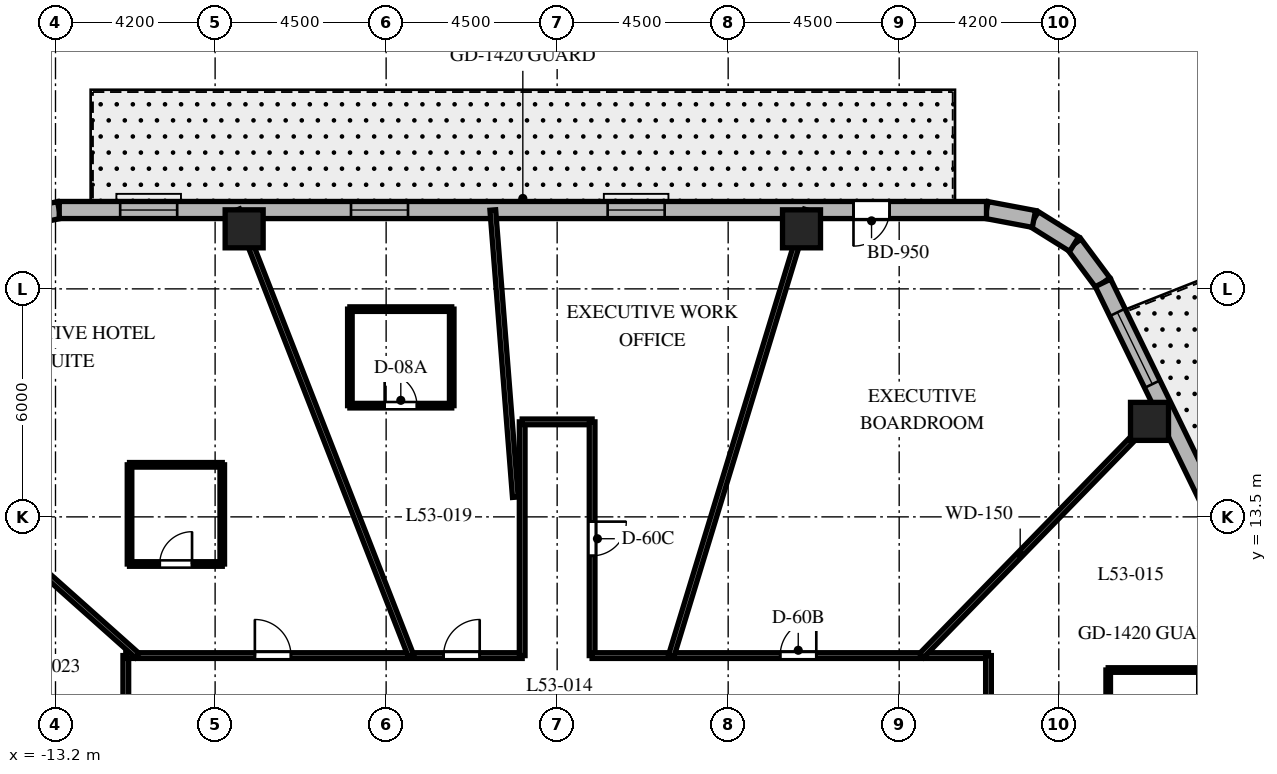
"""IFC4 building model, lengths in metres.
Left out: names, types, materials, properties, quantities, classifications, styles, units other than length and angle.
Written with IfcOpenShell. Run it as: python <this file> out.ifc"""

import sys

from ifc_helpers import new_model, si_unit, direction, frame, frame_2d, origin, origin_2d, place, context, subcontext, project, spatial, rectangle, extrude, element, fill, save


model = new_model("IFC4")
c1 = context("Model", 3, precision=1e-05, world=origin(), true_north=direction((0.0, 1.0)))
c2 = subcontext(c1, "Body", "Model", "MODEL_VIEW")
j1 = project(units=[si_unit("LENGTHUNIT", "METRE"), si_unit("PLANEANGLEUNIT", "RADIAN")], contexts=[c1])
p1 = place(None, origin())
s1 = spatial("IfcSite", under=j1, at=p1, CompositionType="ELEMENT")
p2 = place(p1, origin())
s2 = spatial("IfcBuilding", under=s1, at=p2, CompositionType="ELEMENT")
p3 = place(p2, frame((0.0, 0.0, 214.1)))
s3 = spatial("IfcBuildingStorey", under=s2, at=p3, CompositionType="ELEMENT", Elevation=214.1)
for number, where, z_axis, x_axis in (
    (1, (15.587, 16.013, 0.0), (0.0, 0.0, 1.0), (1.0, 0.0, 0.0)),
    (2, (6.43, 21.08, 0.0), (0.0, 0.0, 1.0), (1.0, 0.0, 0.0)),
    (3, (-8.236, 21.08, 0.0), (0.0, 0.0, 1.0), (1.0, 0.0, 0.0)),
):
    element("IfcColumn", number, at=place(p3, frame(where, z_axis=z_axis, x_axis=x_axis)), inside=s3, PredefinedType="COLUMN", context=c2, shape_type="SweptSolid", body=[
        extrude(rectangle(XDim=1.0, YDim=1.0, at=origin_2d()), origin(), (0.0, 0.0, 1.0), 3.8),
    ])
p4 = place(p3, frame((14.362, 19.658, 0.0), z_axis=(0.0, 0.0, 1.0), x_axis=(-0.596642462792, 0.80250717853, 0.0)))
e4 = element("IfcWall", 4, at=p4, inside=s3, PredefinedType="SOLIDWALL", context=c2, shape_type="SweptSolid", body=[
    extrude(rectangle(XDim=1.27, YDim=0.45, at=frame_2d((0.635, 0.0))), origin(), (0.0, 0.0, 1.0), 3.5),
])
p5 = place(p3, frame((13.604, 20.678, 0.0), z_axis=(0.0, 0.0, 1.0), x_axis=(-0.847910404124, 0.53013955387, 0.0)))
e5 = element("IfcWall", 5, at=p5, inside=s3, PredefinedType="SOLIDWALL", context=c2, shape_type="SweptSolid", body=[
    extrude(rectangle(XDim=1.249, YDim=0.45, at=frame_2d((0.624, 0.0))), origin(), (0.0, 0.0, 1.0), 3.5),
])
p6 = place(p3, frame((12.546, 21.34, 0.0), z_axis=(0.0, 0.0, 1.0), x_axis=(-0.982686750835, 0.18527479519, 0.0)))
e6 = element("IfcWall", 6, at=p6, inside=s3, PredefinedType="SOLIDWALL", context=c2, shape_type="SweptSolid", body=[
    extrude(rectangle(XDim=1.27, YDim=0.45, at=frame_2d((0.635, 0.0))), origin(), (0.0, 0.0, 1.0), 3.5),
])
p7 = place(p3, frame((-13.102, 21.575, 0.0), z_axis=(0.0, 0.0, 1.0), x_axis=(-0.978757421505, -0.205021730188, 0.0)))
e7 = element("IfcWall", 7, at=p7, inside=s3, PredefinedType="SOLIDWALL", context=c2, shape_type="SweptSolid", body=[
    extrude(rectangle(XDim=1.406, YDim=0.45, at=frame_2d((0.703, 0.0))), origin(), (0.0, 0.0, 1.0), 3.5),
])
p8 = place(p3, frame((22.74, 2.452, 0.0), z_axis=(0.0, 0.0, 1.0), x_axis=(-0.437753424814, 0.899095066755, 0.0)))
e8 = element("IfcWall", 8, at=p8, inside=s3, PredefinedType="SOLIDWALL", context=c2, shape_type="SweptSolid", body=[
    extrude(rectangle(XDim=19.137, YDim=0.45, at=frame_2d((9.569, 0.0))), origin(), (0.0, 0.0, 1.0), 3.5),
])
p9 = place(p8, frame((4.763, 0.0, 0.0)))
e9 = element("IfcOpeningElement", 9, at=p9, cuts=e8, PredefinedType="OPENING", context=c2, shape_type="SweptSolid", body=[
    extrude(rectangle(XDim=1.0, YDim=2.15, at=frame_2d((0.5, 1.075))), frame((0.0, 0.235, 0.0), z_axis=(0.0, -1.0, 0.0), x_axis=(1.0, 0.0, 0.0)), (0.0, 0.0, 1.0), 0.47),
])
p10 = place(p8, frame((8.57, 0.0, 0.8)))
e10 = element("IfcOpeningElement", 10, at=p10, cuts=e8, PredefinedType="OPENING", context=c2, shape_type="SweptSolid", body=[
    extrude(rectangle(XDim=2.1, YDim=1.85, at=frame_2d((1.05, 0.925))), frame((0.0, 0.235, 0.0), z_axis=(0.0, -1.0, 0.0), x_axis=(1.0, 0.0, 0.0)), (0.0, 0.0, 1.0), 0.47),
])
p11 = place(p8, frame((16.173, 0.0, 0.8)))
e11 = element("IfcOpeningElement", 11, at=p11, cuts=e8, PredefinedType="OPENING", context=c2, shape_type="SweptSolid", body=[
    extrude(rectangle(XDim=2.1, YDim=1.85, at=frame_2d((1.05, 0.925))), frame((0.0, 0.235, 0.0), z_axis=(0.0, -1.0, 0.0), x_axis=(1.0, 0.0, 0.0)), (0.0, 0.0, 1.0), 0.47),
])
p12 = place(p8, frame((0.916, 0.0, 0.8)))
e12 = element("IfcOpeningElement", 12, at=p12, cuts=e8, PredefinedType="OPENING", context=c2, shape_type="SweptSolid", body=[
    extrude(rectangle(XDim=2.1, YDim=1.85, at=frame_2d((1.05, 0.925))), frame((0.0, 0.235, 0.0), z_axis=(0.0, -1.0, 0.0), x_axis=(1.0, 0.0, 0.0)), (0.0, 0.0, 1.0), 0.47),
])
p13 = place(p3, frame((11.298, 21.575, 0.0), z_axis=(0.0, 0.0, 1.0), x_axis=(-1.0, 0.0, 0.0)))
e13 = element("IfcWall", 13, at=p13, inside=s3, PredefinedType="SOLIDWALL", context=c2, shape_type="SweptSolid", body=[
    extrude(rectangle(XDim=24.399, YDim=0.45, at=frame_2d((12.2, 0.0))), origin(), (0.0, 0.0, 1.0), 3.5),
])
p14 = place(p13, frame((2.55, 0.0, 0.0)))
e14 = element("IfcOpeningElement", 14, at=p14, cuts=e13, PredefinedType="OPENING", context=c2, shape_type="SweptSolid", body=[
    extrude(rectangle(XDim=0.95, YDim=2.15, at=frame_2d((0.475, 1.075))), frame((0.0, 0.235, 0.0), z_axis=(0.0, -1.0, 0.0), x_axis=(1.0, 0.0, 0.0)), (0.0, 0.0, 1.0), 0.47),
])
p15 = place(p13, frame((8.469, 0.0, 0.8)))
e15 = element("IfcOpeningElement", 15, at=p15, cuts=e13, PredefinedType="OPENING", context=c2, shape_type="SweptSolid", body=[
    extrude(rectangle(XDim=1.5, YDim=1.8, at=frame_2d((0.75, 0.9))), frame((0.0, 0.235, 0.0), z_axis=(0.0, -1.0, 0.0), x_axis=(1.0, 0.0, 0.0)), (0.0, 0.0, 1.0), 0.47),
])
p16 = place(p13, frame((15.222, 0.0, 0.8)))
e16 = element("IfcOpeningElement", 16, at=p16, cuts=e13, PredefinedType="OPENING", context=c2, shape_type="SweptSolid", body=[
    extrude(rectangle(XDim=1.5, YDim=1.8, at=frame_2d((0.75, 0.9))), frame((0.0, 0.235, 0.0), z_axis=(0.0, -1.0, 0.0), x_axis=(1.0, 0.0, 0.0)), (0.0, 0.0, 1.0), 0.47),
])
p17 = place(p13, frame((21.296, 0.0, 0.8)))
e17 = element("IfcOpeningElement", 17, at=p17, cuts=e13, PredefinedType="OPENING", context=c2, shape_type="SweptSolid", body=[
    extrude(rectangle(XDim=1.5, YDim=1.8, at=frame_2d((0.75, 0.9))), frame((0.0, 0.235, 0.0), z_axis=(0.0, -1.0, 0.0), x_axis=(1.0, 0.0, 0.0)), (0.0, 0.0, 1.0), 0.47),
])
p18 = place(p3, frame((-11.35, 4.4, 0.0), z_axis=(0.0, 0.0, 1.0), x_axis=(0.0, 1.0, 0.0)))
e18 = element("IfcWall", 18, at=p18, inside=s3, PredefinedType="PARTITIONING", context=c2, shape_type="SweptSolid", body=[
    extrude(rectangle(XDim=5.45, YDim=0.15, at=frame_2d((2.725, 0.0))), origin(), (0.0, 0.0, 1.0), 2.99),
])
p19 = place(p18, frame((2.694, 0.0, 0.0)))
e19 = element("IfcOpeningElement", 19, at=p19, cuts=e18, PredefinedType="OPENING", context=c2, shape_type="SweptSolid", body=[
    extrude(rectangle(XDim=0.95, YDim=2.03, at=frame_2d((0.475, 1.015))), frame((0.0, 0.085, 0.0), z_axis=(0.0, -1.0, 0.0), x_axis=(1.0, 0.0, 0.0)), (0.0, 0.0, 1.0), 0.17),
])
p20 = place(p3, frame((-11.35, 9.85, 0.0), z_axis=(0.0, 0.0, 1.0), x_axis=(1.0, 0.0, 0.0)))
e20 = element("IfcWall", 20, at=p20, inside=s3, PredefinedType="PARTITIONING", context=c2, shape_type="SweptSolid", body=[
    extrude(rectangle(XDim=10.43, YDim=0.15, at=frame_2d((5.215, 0.0))), origin(), (0.0, 0.0, 1.0), 2.99),
])
p21 = place(p20, frame((8.362, 0.0, 0.0)))
e21 = element("IfcOpeningElement", 21, at=p21, cuts=e20, PredefinedType="OPENING", context=c2, shape_type="SweptSolid", body=[
    extrude(rectangle(XDim=0.95, YDim=2.03, at=frame_2d((0.475, 1.015))), frame((0.0, 0.085, 0.0), z_axis=(0.0, -1.0, 0.0), x_axis=(1.0, 0.0, 0.0)), (0.0, 0.0, 1.0), 0.17),
])
p22 = place(p20, frame((3.396, 0.0, 0.0)))
e22 = element("IfcOpeningElement", 22, at=p22, cuts=e20, PredefinedType="OPENING", context=c2, shape_type="SweptSolid", body=[
    extrude(rectangle(XDim=0.95, YDim=2.03, at=frame_2d((0.475, 1.015))), frame((0.0, 0.085, 0.0), z_axis=(0.0, -1.0, 0.0), x_axis=(1.0, 0.0, 0.0)), (0.0, 0.0, 1.0), 0.17),
])
p23 = place(p3, frame((-0.92, 9.85, 0.0), z_axis=(0.0, 0.0, 1.0), x_axis=(0.0, 1.0, 0.0)))
e23 = element("IfcWall", 23, at=p23, inside=s3, PredefinedType="PARTITIONING", context=c2, shape_type="SweptSolid", body=[
    extrude(rectangle(XDim=6.15, YDim=0.15, at=frame_2d((3.075, 0.0))), origin(), (0.0, 0.0, 1.0), 3.026),
])
p24 = place(p3, frame((-0.92, 16.0, 0.0), z_axis=(0.0, 0.0, 1.0), x_axis=(1.0, 0.0, 0.0)))
e24 = element("IfcWall", 24, at=p24, inside=s3, PredefinedType="PARTITIONING", context=c2, shape_type="SweptSolid", body=[
    extrude(rectangle(XDim=1.84, YDim=0.15, at=frame_2d((0.92, 0.0))), origin(), (0.0, 0.0, 1.0), 3.5),
])
p25 = place(p3, frame((0.92, 16.0, 0.0), z_axis=(0.0, 0.0, 1.0), x_axis=(0.0, -1.0, 0.0)))
e25 = element("IfcWall", 25, at=p25, inside=s3, PredefinedType="PARTITIONING", context=c2, shape_type="SweptSolid", body=[
    extrude(rectangle(XDim=6.15, YDim=0.15, at=frame_2d((3.075, 0.0))), origin(), (0.0, 0.0, 1.0), 3.026),
])
p26 = place(p25, frame((2.625, 0.0, 0.0)))
e26 = element("IfcOpeningElement", 26, at=p26, cuts=e25, PredefinedType="OPENING", context=c2, shape_type="SweptSolid", body=[
    extrude(rectangle(XDim=0.9, YDim=2.03, at=frame_2d((0.45, 1.015))), frame((0.0, 0.085, 0.0), z_axis=(0.0, -1.0, 0.0), x_axis=(1.0, 0.0, 0.0)), (0.0, 0.0, 1.0), 0.17),
])
p27 = place(p3, frame((0.92, 9.85, 0.0), z_axis=(0.0, 0.0, 1.0), x_axis=(1.0, 0.0, 0.0)))
e27 = element("IfcWall", 27, at=p27, inside=s3, PredefinedType="PARTITIONING", context=c2, shape_type="SweptSolid", body=[
    extrude(rectangle(XDim=10.43, YDim=0.15, at=frame_2d((5.215, 0.0))), origin(), (0.0, 0.0, 1.0), 2.99),
])
p28 = place(p27, frame((4.949, 0.0, 0.0)))
e28 = element("IfcOpeningElement", 28, at=p28, cuts=e27, PredefinedType="OPENING", context=c2, shape_type="SweptSolid", body=[
    extrude(rectangle(XDim=0.95, YDim=2.03, at=frame_2d((0.475, 1.015))), frame((0.0, 0.085, 0.0), z_axis=(0.0, -1.0, 0.0), x_axis=(1.0, 0.0, 0.0)), (0.0, 0.0, 1.0), 0.17),
])
p29 = place(p3, frame((11.35, 9.85, 0.0), z_axis=(0.0, 0.0, 1.0), x_axis=(0.0, -1.0, 0.0)))
e29 = element("IfcWall", 29, at=p29, inside=s3, PredefinedType="PARTITIONING", context=c2, shape_type="SweptSolid", body=[
    extrude(rectangle(XDim=12.4, YDim=0.15, at=frame_2d((6.2, 0.0))), origin(), (0.0, 0.0, 1.0), 2.99),
])
p30 = place(p29, frame((3.01, 0.0, 0.0)))
e30 = element("IfcOpeningElement", 30, at=p30, cuts=e29, PredefinedType="OPENING", context=c2, shape_type="SweptSolid", body=[
    extrude(rectangle(XDim=0.95, YDim=2.03, at=frame_2d((0.475, 1.015))), frame((0.0, 0.085, 0.0), z_axis=(0.0, -1.0, 0.0), x_axis=(1.0, 0.0, 0.0)), (0.0, 0.0, 1.0), 0.17),
])
p31 = place(p29, frame((8.835, 0.0, 0.0)))
e31 = element("IfcOpeningElement", 31, at=p31, cuts=e29, PredefinedType="OPENING", context=c2, shape_type="SweptSolid", body=[
    extrude(rectangle(XDim=0.95, YDim=2.03, at=frame_2d((0.475, 1.015))), frame((0.0, 0.085, 0.0), z_axis=(0.0, -1.0, 0.0), x_axis=(1.0, 0.0, 0.0)), (0.0, 0.0, 1.0), 0.17),
])
p32 = place(p3, frame((9.588, 9.85, 0.0), z_axis=(0.0, 0.0, 1.0), x_axis=(0.697519469595, 0.716565830567, 0.0)))
e32 = element("IfcWall", 32, at=p32, inside=s3, PredefinedType="PARTITIONING", context=c2, shape_type="SweptSolid", body=[
    extrude(rectangle(XDim=9.126, YDim=0.15, at=frame_2d((4.563, 0.0))), origin(), (0.0, 0.0, 1.0), 2.74),
])
p33 = place(p3, frame((3.004, 9.85, 0.0), z_axis=(0.0, 0.0, 1.0), x_axis=(0.291775760688, 0.956486751333, 0.0)))
e33 = element("IfcWall", 33, at=p33, inside=s3, PredefinedType="PARTITIONING", context=c2, shape_type="SweptSolid", body=[
    extrude(rectangle(XDim=12.258, YDim=0.15, at=frame_2d((6.129, 0.0))), origin(), (0.0, 0.0, 1.0), 2.74),
])
p34 = place(p3, frame((-1.1, 14.018, 0.0), z_axis=(0.0, 0.0, 1.0), x_axis=(-0.078228275349, 0.996935472804, 0.0)))
e34 = element("IfcWall", 34, at=p34, inside=s3, PredefinedType="PARTITIONING", context=c2, shape_type="SweptSolid", body=[
    extrude(rectangle(XDim=7.581, YDim=0.15, at=frame_2d((3.79, 0.0))), origin(), (0.0, 0.0, 1.0), 2.74),
])
p35 = place(p3, frame((-3.848, 9.85, 0.0), z_axis=(0.0, 0.0, 1.0), x_axis=(-0.363921778212, 0.931429513889, 0.0)))
e35 = element("IfcWall", 35, at=p35, inside=s3, PredefinedType="PARTITIONING", context=c2, shape_type="SweptSolid", body=[
    extrude(rectangle(XDim=12.588, YDim=0.15, at=frame_2d((6.294, 0.0))), origin(), (0.0, 0.0, 1.0), 2.74),
])
p36 = place(p3, frame((-11.048, 9.85, 0.0), z_axis=(0.0, 0.0, 1.0), x_axis=(-0.746444434655, 0.665447748492, 0.0)))
e36 = element("IfcWall", 36, at=p36, inside=s3, PredefinedType="PARTITIONING", context=c2, shape_type="SweptSolid", body=[
    extrude(rectangle(XDim=8.732, YDim=0.15, at=frame_2d((4.366, 0.0))), origin(), (0.0, 0.0, 1.0), 2.74),
])
p37 = place(p3, frame((-11.35, 5.528, 0.0), z_axis=(0.0, 0.0, 1.0), x_axis=(-0.899038669565, 0.437869239188, 0.0)))
e37 = element("IfcWall", 37, at=p37, inside=s3, PredefinedType="PARTITIONING", context=c2, shape_type="SweptSolid", body=[
    extrude(rectangle(XDim=9.242, YDim=0.15, at=frame_2d((4.621, 0.0))), origin(), (0.0, 0.0, 1.0), 2.74),
])
p38 = place(p3, frame((16.94, 9.47, 0.0), z_axis=(0.0, 0.0, 1.0), x_axis=(-1.0, 0.0, 0.0)))
e38 = element("IfcWall", 38, at=p38, inside=s3, PredefinedType="PARTITIONING", context=c2, shape_type="SweptSolid", body=[
    extrude(rectangle(XDim=2.44, YDim=0.12, at=frame_2d((1.22, 0.0))), origin(), (0.0, 0.0, 1.0), 3.026),
])
p39 = place(p3, frame((14.5, 9.47, 0.0), z_axis=(0.0, 0.0, 1.0), x_axis=(0.0, -1.0, 0.0)))
e39 = element("IfcWall", 39, at=p39, inside=s3, PredefinedType="PARTITIONING", context=c2, shape_type="SweptSolid", body=[
    extrude(rectangle(XDim=2.61, YDim=0.12, at=frame_2d((1.305, 0.0))), origin(), (0.0, 0.0, 1.0), 3.5),
])
p40 = place(p3, frame((-5.454, 16.427, 0.0), z_axis=(0.0, 0.0, 1.0), x_axis=(1.0, 0.0, 0.0)))
e40 = element("IfcWall", 40, at=p40, inside=s3, PredefinedType="PARTITIONING", context=c2, shape_type="SweptSolid", body=[
    extrude(rectangle(XDim=2.68, YDim=0.12, at=frame_2d((1.34, 0.0))), origin(), (0.0, 0.0, 1.0), 3.5),
])
p41 = place(p40, frame((0.915, 0.0, 0.0)))
e41 = element("IfcOpeningElement", 41, at=p41, cuts=e40, PredefinedType="OPENING", context=c2, shape_type="SweptSolid", body=[
    extrude(rectangle(XDim=0.85, YDim=2.03, at=frame_2d((0.425, 1.015))), frame((0.0, 0.07, 0.0), z_axis=(0.0, -1.0, 0.0), x_axis=(1.0, 0.0, 0.0)), (0.0, 0.0, 1.0), 0.14),
])
p42 = place(p3, frame((-2.774, 16.427, 0.0), z_axis=(0.0, 0.0, 1.0), x_axis=(0.0, 1.0, 0.0)))
e42 = element("IfcWall", 42, at=p42, inside=s3, PredefinedType="PARTITIONING", context=c2, shape_type="SweptSolid", body=[
    extrude(rectangle(XDim=2.54, YDim=0.12, at=frame_2d((1.27, 0.0))), origin(), (0.0, 0.0, 1.0), 2.94),
])
p43 = place(p3, frame((-2.774, 18.967, 0.0), z_axis=(0.0, 0.0, 1.0), x_axis=(-1.0, 0.0, 0.0)))
e43 = element("IfcWall", 43, at=p43, inside=s3, PredefinedType="PARTITIONING", context=c2, shape_type="SweptSolid", body=[
    extrude(rectangle(XDim=2.68, YDim=0.12, at=frame_2d((1.34, 0.0))), origin(), (0.0, 0.0, 1.0), 3.5),
])
p44 = place(p3, frame((-5.454, 18.967, 0.0), z_axis=(0.0, 0.0, 1.0), x_axis=(0.0, -1.0, 0.0)))
e44 = element("IfcWall", 44, at=p44, inside=s3, PredefinedType="PARTITIONING", context=c2, shape_type="SweptSolid", body=[
    extrude(rectangle(XDim=2.54, YDim=0.12, at=frame_2d((1.27, 0.0))), origin(), (0.0, 0.0, 1.0), 2.94),
])
p45 = place(p3, frame((-11.252, 12.26, 0.0), z_axis=(0.0, 0.0, 1.0), x_axis=(1.0, 0.0, 0.0)))
e45 = element("IfcWall", 45, at=p45, inside=s3, PredefinedType="PARTITIONING", context=c2, shape_type="SweptSolid", body=[
    extrude(rectangle(XDim=2.44, YDim=0.12, at=frame_2d((1.22, 0.0))), origin(), (0.0, 0.0, 1.0), 3.072),
])
p46 = place(p45, frame((0.795, 0.0, 0.0)))
e46 = element("IfcOpeningElement", 46, at=p46, cuts=e45, PredefinedType="OPENING", context=c2, shape_type="SweptSolid", body=[
    extrude(rectangle(XDim=0.85, YDim=2.03, at=frame_2d((0.425, 1.015))), frame((0.0, 0.07, 0.0), z_axis=(0.0, -1.0, 0.0), x_axis=(1.0, 0.0, 0.0)), (0.0, 0.0, 1.0), 0.14),
])
p47 = place(p3, frame((-8.812, 12.26, 0.0), z_axis=(0.0, 0.0, 1.0), x_axis=(0.0, 1.0, 0.0)))
e47 = element("IfcWall", 47, at=p47, inside=s3, PredefinedType="PARTITIONING", context=c2, shape_type="SweptSolid", body=[
    extrude(rectangle(XDim=2.61, YDim=0.12, at=frame_2d((1.305, 0.0))), origin(), (0.0, 0.0, 1.0), 2.99),
])
p48 = place(p3, frame((-8.812, 14.87, 0.0), z_axis=(0.0, 0.0, 1.0), x_axis=(-1.0, 0.0, 0.0)))
e48 = element("IfcWall", 48, at=p48, inside=s3, PredefinedType="PARTITIONING", context=c2, shape_type="SweptSolid", body=[
    extrude(rectangle(XDim=2.44, YDim=0.12, at=frame_2d((1.22, 0.0))), origin(), (0.0, 0.0, 1.0), 3.026),
])
p49 = place(p3, frame((-11.252, 14.87, 0.0), z_axis=(0.0, 0.0, 1.0), x_axis=(0.0, -1.0, 0.0)))
e49 = element("IfcWall", 49, at=p49, inside=s3, PredefinedType="PARTITIONING", context=c2, shape_type="SweptSolid", body=[
    extrude(rectangle(XDim=2.61, YDim=0.12, at=frame_2d((1.305, 0.0))), origin(), (0.0, 0.0, 1.0), 3.026),
])
p50 = place(p11, origin())
e50 = element("IfcWindow", 50, at=p50, inside=s3, PartitioningType="SINGLE_PANEL", PredefinedType="WINDOW", context=c2, shape_type="SweptSolid", body=[
    extrude(rectangle(XDim=2.1, YDim=1.85, at=frame_2d((1.05, 0.925))), frame((0.0, 0.03, 0.0), z_axis=(0.0, -1.0, 0.0), x_axis=(1.0, 0.0, 0.0)), (0.0, 0.0, 1.0), 0.06),
])
fill(e11, e50)
p51 = place(p14, origin())
e51 = element("IfcDoor", 51, at=p51, inside=s3, OperationType="SINGLE_SWING_RIGHT", PredefinedType="DOOR", context=c2, shape_type="SweptSolid", body=[
    extrude(rectangle(XDim=0.95, YDim=2.15, at=frame_2d((0.475, 1.075))), frame((0.0, 0.025, 0.0), z_axis=(0.0, -1.0, 0.0), x_axis=(1.0, 0.0, 0.0)), (0.0, 0.0, 1.0), 0.05),
])
fill(e14, e51)
p52 = place(p15, origin())
e52 = element("IfcWindow", 52, at=p52, inside=s3, PartitioningType="SINGLE_PANEL", PredefinedType="WINDOW", context=c2, shape_type="SweptSolid", body=[
    extrude(rectangle(XDim=1.5, YDim=1.8, at=frame_2d((0.75, 0.9))), frame((0.0, 0.03, 0.0), z_axis=(0.0, -1.0, 0.0), x_axis=(1.0, 0.0, 0.0)), (0.0, 0.0, 1.0), 0.06),
])
fill(e15, e52)
p53 = place(p16, origin())
e53 = element("IfcWindow", 53, at=p53, inside=s3, PartitioningType="SINGLE_PANEL", PredefinedType="WINDOW", context=c2, shape_type="SweptSolid", body=[
    extrude(rectangle(XDim=1.5, YDim=1.8, at=frame_2d((0.75, 0.9))), frame((0.0, 0.03, 0.0), z_axis=(0.0, -1.0, 0.0), x_axis=(1.0, 0.0, 0.0)), (0.0, 0.0, 1.0), 0.06),
])
fill(e16, e53)
p54 = place(p17, origin())
e54 = element("IfcWindow", 54, at=p54, inside=s3, PartitioningType="SINGLE_PANEL", PredefinedType="WINDOW", context=c2, shape_type="SweptSolid", body=[
    extrude(rectangle(XDim=1.5, YDim=1.8, at=frame_2d((0.75, 0.9))), frame((0.0, 0.03, 0.0), z_axis=(0.0, -1.0, 0.0), x_axis=(1.0, 0.0, 0.0)), (0.0, 0.0, 1.0), 0.06),
])
fill(e17, e54)
p55 = place(p28, origin())
e55 = element("IfcDoor", 55, at=p55, inside=s3, OperationType="SINGLE_SWING_RIGHT", PredefinedType="DOOR", context=c2, shape_type="SweptSolid", body=[
    extrude(rectangle(XDim=0.95, YDim=2.03, at=frame_2d((0.475, 1.015))), frame((0.0, 0.025, 0.0), z_axis=(0.0, -1.0, 0.0), x_axis=(1.0, 0.0, 0.0)), (0.0, 0.0, 1.0), 0.05),
])
fill(e28, e55)
p56 = place(p26, origin())
e56 = element("IfcDoor", 56, at=p56, inside=s3, OperationType="SINGLE_SWING_LEFT", PredefinedType="DOOR", context=c2, shape_type="SweptSolid", body=[
    extrude(rectangle(XDim=0.9, YDim=2.03, at=frame_2d((0.45, 1.015))), frame((0.0, 0.025, 0.0), z_axis=(0.0, -1.0, 0.0), x_axis=(1.0, 0.0, 0.0)), (0.0, 0.0, 1.0), 0.05),
])
fill(e26, e56)
p57 = place(p21, origin())
e57 = element("IfcDoor", 57, at=p57, inside=s3, OperationType="SINGLE_SWING_RIGHT", PredefinedType="DOOR", context=c2, shape_type="SweptSolid", body=[
    extrude(rectangle(XDim=0.95, YDim=2.03, at=frame_2d((0.475, 1.015))), frame((0.0, 0.025, 0.0), z_axis=(0.0, -1.0, 0.0), x_axis=(1.0, 0.0, 0.0)), (0.0, 0.0, 1.0), 0.05),
])
fill(e21, e57)
p58 = place(p41, origin())
e58 = element("IfcDoor", 58, at=p58, inside=s3, OperationType="SINGLE_SWING_LEFT", PredefinedType="DOOR", context=c2, shape_type="SweptSolid", body=[
    extrude(rectangle(XDim=0.85, YDim=2.03, at=frame_2d((0.425, 1.015))), frame((0.0, 0.025, 0.0), z_axis=(0.0, -1.0, 0.0), x_axis=(1.0, 0.0, 0.0)), (0.0, 0.0, 1.0), 0.05),
])
fill(e41, e58)
p59 = place(p22, origin())
e59 = element("IfcDoor", 59, at=p59, inside=s3, OperationType="SINGLE_SWING_LEFT", PredefinedType="DOOR", context=c2, shape_type="SweptSolid", body=[
    extrude(rectangle(XDim=0.95, YDim=2.03, at=frame_2d((0.475, 1.015))), frame((0.0, 0.025, 0.0), z_axis=(0.0, -1.0, 0.0), x_axis=(1.0, 0.0, 0.0)), (0.0, 0.0, 1.0), 0.05),
])
fill(e22, e59)
p60 = place(p46, origin())
e60 = element("IfcDoor", 60, at=p60, inside=s3, OperationType="SINGLE_SWING_RIGHT", PredefinedType="DOOR", context=c2, shape_type="SweptSolid", body=[
    extrude(rectangle(XDim=0.85, YDim=2.03, at=frame_2d((0.425, 1.015))), frame((0.0, 0.025, 0.0), z_axis=(0.0, -1.0, 0.0), x_axis=(1.0, 0.0, 0.0)), (0.0, 0.0, 1.0), 0.05),
])
fill(e46, e60)
save(model, sys.argv[1])
